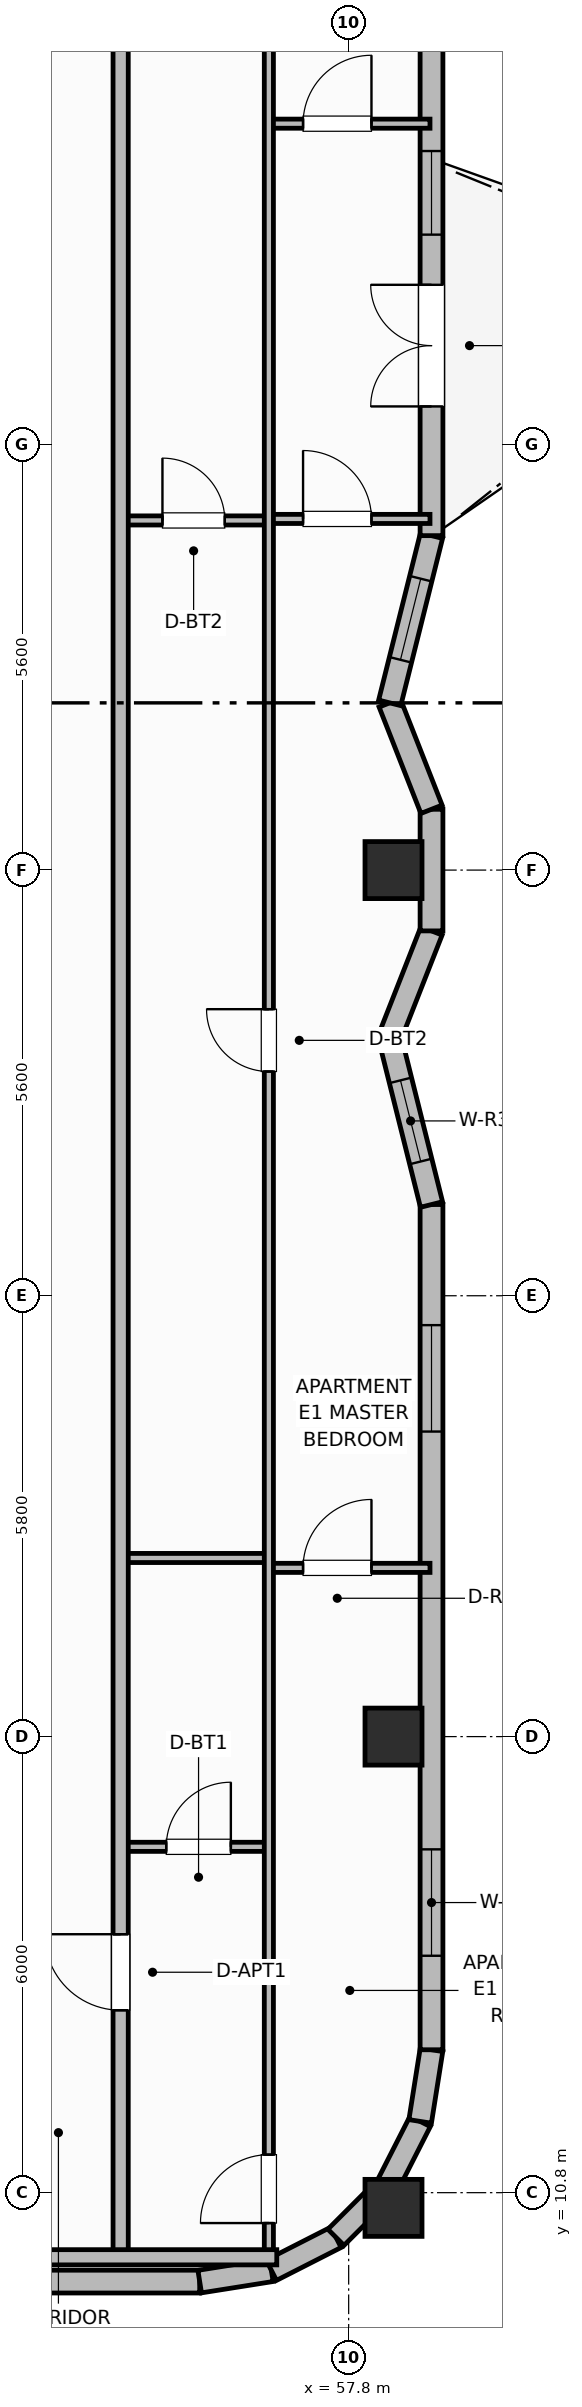
"""IFC4 building model, lengths in metres.
Left out: names, types, materials, properties, quantities, classifications, styles, units other than length and angle.
Written with IfcOpenShell. Run it as: python <this file> out.ifc"""

import sys

from ifc_helpers import new_model, si_unit, direction, frame, frame_2d, origin, origin_2d, place, context, subcontext, project, spatial, rectangle, extrude, element, fill, save


model = new_model("IFC4")
c1 = context("Model", 3, precision=1e-05, world=origin(), true_north=direction((0.0, 1.0)))
c2 = subcontext(c1, "Body", "Model", "MODEL_VIEW")
j1 = project(units=[si_unit("LENGTHUNIT", "METRE"), si_unit("PLANEANGLEUNIT", "RADIAN")], contexts=[c1])
p1 = place(None, origin())
s1 = spatial("IfcSite", under=j1, at=p1, CompositionType="ELEMENT")
p2 = place(p1, origin())
s2 = spatial("IfcBuilding", under=s1, at=p2, CompositionType="ELEMENT")
p3 = place(p2, frame((0.0, 0.0, 263.9)))
s3 = spatial("IfcBuildingStorey", under=s2, at=p3, CompositionType="ELEMENT", Elevation=263.9)
for number, where, z_axis, x_axis in (
    (1, (58.39, 10.6, 0.0), (0.0, 0.0, 1.0), (1.0, 0.0, 0.0)),
    (2, (58.39, 16.8, 0.0), (0.0, 0.0, 1.0), (1.0, 0.0, 0.0)),
    (3, (58.39, 28.2, 0.0), (0.0, 0.0, 1.0), (1.0, 0.0, 0.0)),
):
    element("IfcColumn", number, at=place(p3, frame(where, z_axis=z_axis, x_axis=x_axis)), inside=s3, PredefinedType="COLUMN", context=c2, shape_type="SweptSolid", body=[
        extrude(rectangle(XDim=0.75, YDim=0.75, at=origin_2d()), origin(), (0.0, 0.0, 1.0), 3.7),
    ])
p4 = place(p3, frame((22.56, 9.63, 0.0), z_axis=(0.0, 0.0, 1.0), x_axis=(1.0, 0.0, 0.0)))
e4 = element("IfcWall", 4, at=p4, inside=s3, PredefinedType="SOLIDWALL", context=c2, shape_type="SweptSolid", body=[
    extrude(rectangle(XDim=33.28, YDim=0.3, at=frame_2d((16.64, 0.0))), origin(), (0.0, 0.0, 1.0), 2.73),
])
p5 = place(p4, frame((5.18, 0.0, 0.71)))
e5 = element("IfcOpeningElement", 5, at=p5, cuts=e4, PredefinedType="OPENING", context=c2, shape_type="SweptSolid", body=[
    extrude(rectangle(XDim=1.6, YDim=1.9, at=frame_2d((0.8, 0.95))), frame((0.0, 0.16, 0.0), z_axis=(0.0, -1.0, 0.0), x_axis=(1.0, 0.0, 0.0)), (0.0, 0.0, 1.0), 0.32),
])
p6 = place(p4, frame((8.733, 0.0, 0.71)))
e6 = element("IfcOpeningElement", 6, at=p6, cuts=e4, PredefinedType="OPENING", context=c2, shape_type="SweptSolid", body=[
    extrude(rectangle(XDim=1.6, YDim=1.9, at=frame_2d((0.8, 0.95))), frame((0.0, 0.16, 0.0), z_axis=(0.0, -1.0, 0.0), x_axis=(1.0, 0.0, 0.0)), (0.0, 0.0, 1.0), 0.32),
])
p7 = place(p4, frame((15.84, 0.0, 0.71)))
e7 = element("IfcOpeningElement", 7, at=p7, cuts=e4, PredefinedType="OPENING", context=c2, shape_type="SweptSolid", body=[
    extrude(rectangle(XDim=1.6, YDim=1.9, at=frame_2d((0.8, 0.95))), frame((0.0, 0.16, 0.0), z_axis=(0.0, -1.0, 0.0), x_axis=(1.0, 0.0, 0.0)), (0.0, 0.0, 1.0), 0.32),
])
p8 = place(p4, frame((22.947, 0.0, 0.71)))
e8 = element("IfcOpeningElement", 8, at=p8, cuts=e4, PredefinedType="OPENING", context=c2, shape_type="SweptSolid", body=[
    extrude(rectangle(XDim=1.6, YDim=1.9, at=frame_2d((0.8, 0.95))), frame((0.0, 0.16, 0.0), z_axis=(0.0, -1.0, 0.0), x_axis=(1.0, 0.0, 0.0)), (0.0, 0.0, 1.0), 0.32),
])
p9 = place(p4, frame((26.5, 0.0, 0.71)))
e9 = element("IfcOpeningElement", 9, at=p9, cuts=e4, PredefinedType="OPENING", context=c2, shape_type="SweptSolid", body=[
    extrude(rectangle(XDim=1.6, YDim=1.9, at=frame_2d((0.8, 0.95))), frame((0.0, 0.16, 0.0), z_axis=(0.0, -1.0, 0.0), x_axis=(1.0, 0.0, 0.0)), (0.0, 0.0, 1.0), 0.32),
])
p10 = place(p3, frame((55.84, 9.63, 0.0), z_axis=(0.0, 0.0, 1.0), x_axis=(0.987663181641, 0.156593229835, 0.0)))
e10 = element("IfcWall", 10, at=p10, inside=s3, PredefinedType="SOLIDWALL", context=c2, shape_type="SweptSolid", body=[
    extrude(rectangle(XDim=0.954, YDim=0.3, at=frame_2d((0.477, 0.0))), origin(), (0.0, 0.0, 1.0), 2.73),
])
for number, where, z_axis, x_axis in (
    (11, (56.782, 9.779, 0.0), (0.0, 0.0, 1.0), (0.891, 0.454, 0.0)),
    (12, (57.633, 10.212, 0.0), (0.0, 0.0, 1.0), (0.707, 0.707, 0.0)),
    (13, (58.308, 10.887, 0.0), (0.0, 0.0, 1.0), (0.454, 0.891, 0.0)),
):
    element("IfcWall", number, at=place(p3, frame(where, z_axis=z_axis, x_axis=x_axis)), inside=s3, PredefinedType="SOLIDWALL", context=c2, shape_type="SweptSolid", body=[
        extrude(rectangle(XDim=0.954, YDim=0.3, at=frame_2d((0.477, 0.0))), origin(), (0.0, 0.0, 1.0), 2.73),
    ])
p11 = place(p3, frame((58.741, 11.738, 0.0), z_axis=(0.0, 0.0, 1.0), x_axis=(0.156343617883, 0.987702725088, 0.0)))
e14 = element("IfcWall", 14, at=p11, inside=s3, PredefinedType="SOLIDWALL", context=c2, shape_type="SweptSolid", body=[
    extrude(rectangle(XDim=0.954, YDim=0.3, at=frame_2d((0.477, 0.0))), origin(), (0.0, 0.0, 1.0), 2.73),
])
p12 = place(p3, frame((58.89, 12.68, 0.0), z_axis=(0.0, 0.0, 1.0), x_axis=(0.0, 1.0, 0.0)))
e15 = element("IfcWall", 15, at=p12, inside=s3, PredefinedType="SOLIDWALL", context=c2, shape_type="SweptSolid", body=[
    extrude(rectangle(XDim=11.12, YDim=0.3, at=frame_2d((5.56, 0.0))), origin(), (0.0, 0.0, 1.0), 2.73),
])
p13 = place(p12, frame((1.237, 0.0, 0.76)))
e16 = element("IfcOpeningElement", 16, at=p13, cuts=e15, PredefinedType="OPENING", context=c2, shape_type="SweptSolid", body=[
    extrude(rectangle(XDim=1.4, YDim=1.85, at=frame_2d((0.7, 0.925))), frame((0.0, 0.16, 0.0), z_axis=(0.0, -1.0, 0.0), x_axis=(1.0, 0.0, 0.0)), (0.0, 0.0, 1.0), 0.32),
])
p14 = place(p12, frame((8.133, 0.0, 0.76)))
e17 = element("IfcOpeningElement", 17, at=p14, cuts=e15, PredefinedType="OPENING", context=c2, shape_type="SweptSolid", body=[
    extrude(rectangle(XDim=1.4, YDim=1.85, at=frame_2d((0.7, 0.925))), frame((0.0, 0.16, 0.0), z_axis=(0.0, -1.0, 0.0), x_axis=(1.0, 0.0, 0.0)), (0.0, 0.0, 1.0), 0.32),
])
p15 = place(p3, frame((58.89, 23.8, 0.0), z_axis=(0.0, 0.0, 1.0), x_axis=(-0.242459626081, 0.970161496721, 0.0)))
e18 = element("IfcWall", 18, at=p15, inside=s3, PredefinedType="SOLIDWALL", context=c2, shape_type="SweptSolid", body=[
    extrude(rectangle(XDim=2.268, YDim=0.3, at=frame_2d((1.134, 0.0))), origin(), (0.0, 0.0, 1.0), 2.73),
])
p16 = place(p15, frame((0.584, 0.0, 0.92)))
e19 = element("IfcOpeningElement", 19, at=p16, cuts=e18, PredefinedType="OPENING", context=c2, shape_type="SweptSolid", body=[
    extrude(rectangle(XDim=1.1, YDim=1.65, at=frame_2d((0.55, 0.825))), frame((0.0, 0.16, 0.0), z_axis=(0.0, -1.0, 0.0), x_axis=(1.0, 0.0, 0.0)), (0.0, 0.0, 1.0), 0.32),
])
p17 = place(p3, frame((58.34, 26.0, 0.0), z_axis=(0.0, 0.0, 1.0), x_axis=(0.365561969418, 0.930787003839, 0.0)))
e20 = element("IfcWall", 20, at=p17, inside=s3, PredefinedType="SOLIDWALL", context=c2, shape_type="SweptSolid", body=[
    extrude(rectangle(XDim=1.504, YDim=0.3, at=frame_2d((0.752, 0.0))), origin(), (0.0, 0.0, 1.0), 2.73),
])
p18 = place(p3, frame((58.89, 27.4, 0.0), z_axis=(0.0, 0.0, 1.0), x_axis=(0.0, 1.0, 0.0)))
e21 = element("IfcWall", 21, at=p18, inside=s3, PredefinedType="SOLIDWALL", context=c2, shape_type="SweptSolid", body=[
    extrude(rectangle(XDim=1.6, YDim=0.3, at=frame_2d((0.8, 0.0))), origin(), (0.0, 0.0, 1.0), 2.73),
])
p19 = place(p3, frame((58.89, 29.0, 0.0), z_axis=(0.0, 0.0, 1.0), x_axis=(-0.365561969418, 0.930787003839, 0.0)))
e22 = element("IfcWall", 22, at=p19, inside=s3, PredefinedType="SOLIDWALL", context=c2, shape_type="SweptSolid", body=[
    extrude(rectangle(XDim=1.504, YDim=0.3, at=frame_2d((0.752, 0.0))), origin(), (0.0, 0.0, 1.0), 2.73),
])
p20 = place(p3, frame((58.34, 30.4, 0.0), z_axis=(0.0, 0.0, 1.0), x_axis=(0.242434303349, 0.970167824946, 0.0)))
e23 = element("IfcWall", 23, at=p20, inside=s3, PredefinedType="SOLIDWALL", context=c2, shape_type="SweptSolid", body=[
    extrude(rectangle(XDim=2.268, YDim=0.3, at=frame_2d((1.134, 0.0))), origin(), (0.0, 0.0, 1.0), 2.73),
])
p21 = place(p20, frame((0.584, 0.0, 0.92)))
e24 = element("IfcOpeningElement", 24, at=p21, cuts=e23, PredefinedType="OPENING", context=c2, shape_type="SweptSolid", body=[
    extrude(rectangle(XDim=1.1, YDim=1.65, at=frame_2d((0.55, 0.825))), frame((0.0, 0.16, 0.0), z_axis=(0.0, -1.0, 0.0), x_axis=(1.0, 0.0, 0.0)), (0.0, 0.0, 1.0), 0.32),
])
p22 = place(p3, frame((58.89, 32.6, 0.0), z_axis=(0.0, 0.0, 1.0), x_axis=(0.0, 1.0, 0.0)))
e25 = element("IfcWall", 25, at=p22, inside=s3, PredefinedType="SOLIDWALL", context=c2, shape_type="SweptSolid", body=[
    extrude(rectangle(XDim=11.12, YDim=0.3, at=frame_2d((5.56, 0.0))), origin(), (0.0, 0.0, 1.0), 2.73),
])
p23 = place(p22, frame((1.7, 0.0, 0.0)))
e26 = element("IfcOpeningElement", 26, at=p23, cuts=e25, PredefinedType="OPENING", context=c2, shape_type="SweptSolid", body=[
    extrude(rectangle(XDim=1.6, YDim=2.1, at=frame_2d((0.8, 1.05))), frame((0.0, 0.16, 0.0), z_axis=(0.0, -1.0, 0.0), x_axis=(1.0, 0.0, 0.0)), (0.0, 0.0, 1.0), 0.32),
])
p24 = place(p22, frame((3.96, 0.0, 0.95)))
e27 = element("IfcOpeningElement", 27, at=p24, cuts=e25, PredefinedType="OPENING", context=c2, shape_type="SweptSolid", body=[
    extrude(rectangle(XDim=1.1, YDim=1.65, at=frame_2d((0.55, 0.825))), frame((0.0, 0.16, 0.0), z_axis=(0.0, -1.0, 0.0), x_axis=(1.0, 0.0, 0.0)), (0.0, 0.0, 1.0), 0.32),
])
p25 = place(p22, frame((8.283, 0.0, 0.95)))
e28 = element("IfcOpeningElement", 28, at=p25, cuts=e25, PredefinedType="OPENING", context=c2, shape_type="SweptSolid", body=[
    extrude(rectangle(XDim=1.1, YDim=1.65, at=frame_2d((0.55, 0.825))), frame((0.0, 0.16, 0.0), z_axis=(0.0, -1.0, 0.0), x_axis=(1.0, 0.0, 0.0)), (0.0, 0.0, 1.0), 0.32),
])
p26 = place(p3, frame((54.8, 15.35, 0.0), z_axis=(0.0, 0.0, 1.0), x_axis=(1.0, 0.0, 0.0)))
e29 = element("IfcWall", 29, at=p26, inside=s3, PredefinedType="PARTITIONING", context=c2, shape_type="SweptSolid", body=[
    extrude(rectangle(XDim=1.95, YDim=0.12, at=frame_2d((0.975, 0.0))), origin(), (0.0, 0.0, 1.0), 2.56),
])
p27 = place(p26, frame((0.6, 0.0, 0.0)))
e30 = element("IfcOpeningElement", 30, at=p27, cuts=e29, PredefinedType="OPENING", context=c2, shape_type="SweptSolid", body=[
    extrude(rectangle(XDim=0.85, YDim=2.1, at=frame_2d((0.425, 1.05))), frame((0.0, 0.07, 0.0), z_axis=(0.0, -1.0, 0.0), x_axis=(1.0, 0.0, 0.0)), (0.0, 0.0, 1.0), 0.14),
])
p28 = place(p3, frame((54.8, 19.15, 0.0), z_axis=(0.0, 0.0, 1.0), x_axis=(1.0, 0.0, 0.0)))
e31 = element("IfcWall", 31, at=p28, inside=s3, PredefinedType="PARTITIONING", context=c2, shape_type="SweptSolid", body=[
    extrude(rectangle(XDim=1.95, YDim=0.12, at=frame_2d((0.975, 0.0))), origin(), (0.0, 0.0, 1.0), 2.56),
])
p29 = place(p3, frame((54.8, 32.8, 0.0), z_axis=(0.0, 0.0, 1.0), x_axis=(1.0, 0.0, 0.0)))
e32 = element("IfcWall", 32, at=p29, inside=s3, PredefinedType="PARTITIONING", context=c2, shape_type="SweptSolid", body=[
    extrude(rectangle(XDim=1.95, YDim=0.12, at=frame_2d((0.975, 0.0))), origin(), (0.0, 0.0, 1.0), 2.56),
])
p30 = place(p29, frame((0.55, 0.0, 0.0)))
e33 = element("IfcOpeningElement", 33, at=p30, cuts=e32, PredefinedType="OPENING", context=c2, shape_type="SweptSolid", body=[
    extrude(rectangle(XDim=0.82, YDim=2.08, at=frame_2d((0.41, 1.04))), frame((0.0, 0.07, 0.0), z_axis=(0.0, -1.0, 0.0), x_axis=(1.0, 0.0, 0.0)), (0.0, 0.0, 1.0), 0.14),
])
p31 = place(p3, frame((56.75, 19.02, 0.0), z_axis=(0.0, 0.0, 1.0), x_axis=(1.0, 0.0, 0.0)))
e34 = element("IfcWall", 34, at=p31, inside=s3, PredefinedType="PARTITIONING", context=c2, shape_type="SweptSolid", body=[
    extrude(rectangle(XDim=2.12, YDim=0.12, at=frame_2d((1.06, 0.0))), origin(), (0.0, 0.0, 1.0), 2.56),
])
p32 = place(p31, frame((0.45, 0.0, 0.0)))
e35 = element("IfcOpeningElement", 35, at=p32, cuts=e34, PredefinedType="OPENING", context=c2, shape_type="SweptSolid", body=[
    extrude(rectangle(XDim=0.9, YDim=2.1, at=frame_2d((0.45, 1.05))), frame((0.0, 0.07, 0.0), z_axis=(0.0, -1.0, 0.0), x_axis=(1.0, 0.0, 0.0)), (0.0, 0.0, 1.0), 0.14),
])
p33 = place(p3, frame((56.75, 32.82, 0.0), z_axis=(0.0, 0.0, 1.0), x_axis=(1.0, 0.0, 0.0)))
e36 = element("IfcWall", 36, at=p33, inside=s3, PredefinedType="PARTITIONING", context=c2, shape_type="SweptSolid", body=[
    extrude(rectangle(XDim=2.12, YDim=0.12, at=frame_2d((1.06, 0.0))), origin(), (0.0, 0.0, 1.0), 2.56),
])
p34 = place(p33, frame((0.45, 0.0, 0.0)))
e37 = element("IfcOpeningElement", 37, at=p34, cuts=e36, PredefinedType="OPENING", context=c2, shape_type="SweptSolid", body=[
    extrude(rectangle(XDim=0.9, YDim=2.1, at=frame_2d((0.45, 1.05))), frame((0.0, 0.07, 0.0), z_axis=(0.0, -1.0, 0.0), x_axis=(1.0, 0.0, 0.0)), (0.0, 0.0, 1.0), 0.14),
])
p35 = place(p3, frame((56.75, 38.02, 0.0), z_axis=(0.0, 0.0, 1.0), x_axis=(1.0, 0.0, 0.0)))
e38 = element("IfcWall", 38, at=p35, inside=s3, PredefinedType="PARTITIONING", context=c2, shape_type="SweptSolid", body=[
    extrude(rectangle(XDim=2.12, YDim=0.12, at=frame_2d((1.06, 0.0))), origin(), (0.0, 0.0, 1.0), 2.56),
])
p36 = place(p35, frame((0.45, 0.0, 0.0)))
e39 = element("IfcOpeningElement", 39, at=p36, cuts=e38, PredefinedType="OPENING", context=c2, shape_type="SweptSolid", body=[
    extrude(rectangle(XDim=0.9, YDim=2.1, at=frame_2d((0.45, 1.05))), frame((0.0, 0.07, 0.0), z_axis=(0.0, -1.0, 0.0), x_axis=(1.0, 0.0, 0.0)), (0.0, 0.0, 1.0), 0.14),
])
p37 = place(p3, frame((56.75, 9.99, 0.0), z_axis=(0.0, 0.0, 1.0), x_axis=(0.0, 1.0, 0.0)))
e40 = element("IfcWall", 40, at=p37, inside=s3, PredefinedType="PARTITIONING", context=c2, shape_type="SweptSolid", body=[
    extrude(rectangle(XDim=36.42, YDim=0.12, at=frame_2d((18.21, 0.0))), origin(), (0.0, 0.0, 1.0), 2.56),
])
p38 = place(p37, frame((0.41, 0.0, 0.0)))
e41 = element("IfcOpeningElement", 41, at=p38, cuts=e40, PredefinedType="OPENING", context=c2, shape_type="SweptSolid", body=[
    extrude(rectangle(XDim=0.9, YDim=2.1, at=frame_2d((0.45, 1.05))), frame((0.0, 0.07, 0.0), z_axis=(0.0, -1.0, 0.0), x_axis=(1.0, 0.0, 0.0)), (0.0, 0.0, 1.0), 0.14),
])
p39 = place(p37, frame((15.56, 0.0, 0.0)))
e42 = element("IfcOpeningElement", 42, at=p39, cuts=e40, PredefinedType="OPENING", context=c2, shape_type="SweptSolid", body=[
    extrude(rectangle(XDim=0.82, YDim=2.08, at=frame_2d((0.41, 1.04))), frame((0.0, 0.07, 0.0), z_axis=(0.0, -1.0, 0.0), x_axis=(1.0, 0.0, 0.0)), (0.0, 0.0, 1.0), 0.14),
])
p40 = place(p3, frame((54.8, 9.95, 0.0), z_axis=(0.0, 0.0, 1.0), x_axis=(0.0, 1.0, 0.0)))
e43 = element("IfcWall", 43, at=p40, inside=s3, PredefinedType="PARTITIONING", context=c2, shape_type="SweptSolid", body=[
    extrude(rectangle(XDim=36.5, YDim=0.2, at=frame_2d((18.25, 0.0))), origin(), (0.0, 0.0, 1.0), 2.56),
])
p41 = place(p40, frame((3.25, 0.0, 0.0)))
e44 = element("IfcOpeningElement", 44, at=p41, cuts=e43, PredefinedType="OPENING", context=c2, shape_type="SweptSolid", body=[
    extrude(rectangle(XDim=1.0, YDim=2.15, at=frame_2d((0.5, 1.075))), frame((0.0, 0.11, 0.0), z_axis=(0.0, -1.0, 0.0), x_axis=(1.0, 0.0, 0.0)), (0.0, 0.0, 1.0), 0.22),
])
p42 = place(p3, frame((53.1, 9.95, 0.0), z_axis=(0.0, 0.0, 1.0), x_axis=(1.0, 0.0, 0.0)))
e45 = element("IfcWall", 45, at=p42, inside=s3, PredefinedType="PARTITIONING", context=c2, shape_type="SweptSolid", body=[
    extrude(rectangle(XDim=3.754, YDim=0.2, at=frame_2d((1.877, 0.0))), origin(), (0.0, 0.0, 1.0), 2.56),
])
p43 = place(p13, origin())
e46 = element("IfcWindow", 46, at=p43, inside=s3, PartitioningType="SINGLE_PANEL", PredefinedType="WINDOW", context=c2, shape_type="SweptSolid", body=[
    extrude(rectangle(XDim=1.4, YDim=1.85, at=frame_2d((0.7, 0.925))), frame((0.0, 0.03, 0.0), z_axis=(0.0, -1.0, 0.0), x_axis=(1.0, 0.0, 0.0)), (0.0, 0.0, 1.0), 0.06),
])
fill(e16, e46)
p44 = place(p14, origin())
e47 = element("IfcWindow", 47, at=p44, inside=s3, PartitioningType="SINGLE_PANEL", PredefinedType="WINDOW", context=c2, shape_type="SweptSolid", body=[
    extrude(rectangle(XDim=1.4, YDim=1.85, at=frame_2d((0.7, 0.925))), frame((0.0, 0.03, 0.0), z_axis=(0.0, -1.0, 0.0), x_axis=(1.0, 0.0, 0.0)), (0.0, 0.0, 1.0), 0.06),
])
fill(e17, e47)
p45 = place(p16, origin())
e48 = element("IfcWindow", 48, at=p45, inside=s3, PartitioningType="SINGLE_PANEL", PredefinedType="WINDOW", context=c2, shape_type="SweptSolid", body=[
    extrude(rectangle(XDim=1.1, YDim=1.65, at=frame_2d((0.55, 0.825))), frame((0.0, 0.03, 0.0), z_axis=(0.0, -1.0, 0.0), x_axis=(1.0, 0.0, 0.0)), (0.0, 0.0, 1.0), 0.06),
])
fill(e19, e48)
p46 = place(p21, origin())
e49 = element("IfcWindow", 49, at=p46, inside=s3, PartitioningType="SINGLE_PANEL", PredefinedType="WINDOW", context=c2, shape_type="SweptSolid", body=[
    extrude(rectangle(XDim=1.1, YDim=1.65, at=frame_2d((0.55, 0.825))), frame((0.0, 0.03, 0.0), z_axis=(0.0, -1.0, 0.0), x_axis=(1.0, 0.0, 0.0)), (0.0, 0.0, 1.0), 0.06),
])
fill(e24, e49)
p47 = place(p23, origin())
e50 = element("IfcDoor", 50, at=p47, inside=s3, OperationType="DOUBLE_DOOR_SINGLE_SWING", PredefinedType="DOOR", context=c2, shape_type="SweptSolid", body=[
    extrude(rectangle(XDim=1.6, YDim=2.1, at=frame_2d((0.8, 1.05))), frame((0.0, 0.025, 0.0), z_axis=(0.0, -1.0, 0.0), x_axis=(1.0, 0.0, 0.0)), (0.0, 0.0, 1.0), 0.05),
])
fill(e26, e50)
p48 = place(p24, origin())
e51 = element("IfcWindow", 51, at=p48, inside=s3, PartitioningType="SINGLE_PANEL", PredefinedType="WINDOW", context=c2, shape_type="SweptSolid", body=[
    extrude(rectangle(XDim=1.1, YDim=1.65, at=frame_2d((0.55, 0.825))), frame((0.0, 0.03, 0.0), z_axis=(0.0, -1.0, 0.0), x_axis=(1.0, 0.0, 0.0)), (0.0, 0.0, 1.0), 0.06),
])
fill(e27, e51)
p49 = place(p27, origin())
e52 = element("IfcDoor", 52, at=p49, inside=s3, OperationType="SINGLE_SWING_RIGHT", PredefinedType="DOOR", context=c2, shape_type="SweptSolid", body=[
    extrude(rectangle(XDim=0.85, YDim=2.1, at=frame_2d((0.425, 1.05))), frame((0.0, 0.025, 0.0), z_axis=(0.0, -1.0, 0.0), x_axis=(1.0, 0.0, 0.0)), (0.0, 0.0, 1.0), 0.05),
])
fill(e30, e52)
p50 = place(p30, origin())
e53 = element("IfcDoor", 53, at=p50, inside=s3, OperationType="SINGLE_SWING_LEFT", PredefinedType="DOOR", context=c2, shape_type="SweptSolid", body=[
    extrude(rectangle(XDim=0.82, YDim=2.08, at=frame_2d((0.41, 1.04))), frame((0.0, 0.025, 0.0), z_axis=(0.0, -1.0, 0.0), x_axis=(1.0, 0.0, 0.0)), (0.0, 0.0, 1.0), 0.05),
])
fill(e33, e53)
p51 = place(p32, origin())
e54 = element("IfcDoor", 54, at=p51, inside=s3, OperationType="SINGLE_SWING_RIGHT", PredefinedType="DOOR", context=c2, shape_type="SweptSolid", body=[
    extrude(rectangle(XDim=0.9, YDim=2.1, at=frame_2d((0.45, 1.05))), frame((0.0, 0.025, 0.0), z_axis=(0.0, -1.0, 0.0), x_axis=(1.0, 0.0, 0.0)), (0.0, 0.0, 1.0), 0.05),
])
fill(e35, e54)
p52 = place(p34, origin())
e55 = element("IfcDoor", 55, at=p52, inside=s3, OperationType="SINGLE_SWING_LEFT", PredefinedType="DOOR", context=c2, shape_type="SweptSolid", body=[
    extrude(rectangle(XDim=0.9, YDim=2.1, at=frame_2d((0.45, 1.05))), frame((0.0, 0.025, 0.0), z_axis=(0.0, -1.0, 0.0), x_axis=(1.0, 0.0, 0.0)), (0.0, 0.0, 1.0), 0.05),
])
fill(e37, e55)
p53 = place(p36, origin())
e56 = element("IfcDoor", 56, at=p53, inside=s3, OperationType="SINGLE_SWING_RIGHT", PredefinedType="DOOR", context=c2, shape_type="SweptSolid", body=[
    extrude(rectangle(XDim=0.9, YDim=2.1, at=frame_2d((0.45, 1.05))), frame((0.0, 0.025, 0.0), z_axis=(0.0, -1.0, 0.0), x_axis=(1.0, 0.0, 0.0)), (0.0, 0.0, 1.0), 0.05),
])
fill(e39, e56)
p54 = place(p38, origin())
e57 = element("IfcDoor", 57, at=p54, inside=s3, OperationType="SINGLE_SWING_LEFT", PredefinedType="DOOR", context=c2, shape_type="SweptSolid", body=[
    extrude(rectangle(XDim=0.9, YDim=2.1, at=frame_2d((0.45, 1.05))), frame((0.0, 0.025, 0.0), z_axis=(0.0, -1.0, 0.0), x_axis=(1.0, 0.0, 0.0)), (0.0, 0.0, 1.0), 0.05),
])
fill(e41, e57)
p55 = place(p39, origin())
e58 = element("IfcDoor", 58, at=p55, inside=s3, OperationType="SINGLE_SWING_RIGHT", PredefinedType="DOOR", context=c2, shape_type="SweptSolid", body=[
    extrude(rectangle(XDim=0.82, YDim=2.08, at=frame_2d((0.41, 1.04))), frame((0.0, 0.025, 0.0), z_axis=(0.0, -1.0, 0.0), x_axis=(1.0, 0.0, 0.0)), (0.0, 0.0, 1.0), 0.05),
])
fill(e42, e58)
p56 = place(p41, origin())
e59 = element("IfcDoor", 59, at=p56, inside=s3, OperationType="SINGLE_SWING_RIGHT", PredefinedType="DOOR", context=c2, shape_type="SweptSolid", body=[
    extrude(rectangle(XDim=1.0, YDim=2.15, at=frame_2d((0.5, 1.075))), frame((0.0, 0.025, 0.0), z_axis=(0.0, -1.0, 0.0), x_axis=(1.0, 0.0, 0.0)), (0.0, 0.0, 1.0), 0.05),
])
fill(e44, e59)
save(model, sys.argv[1])
